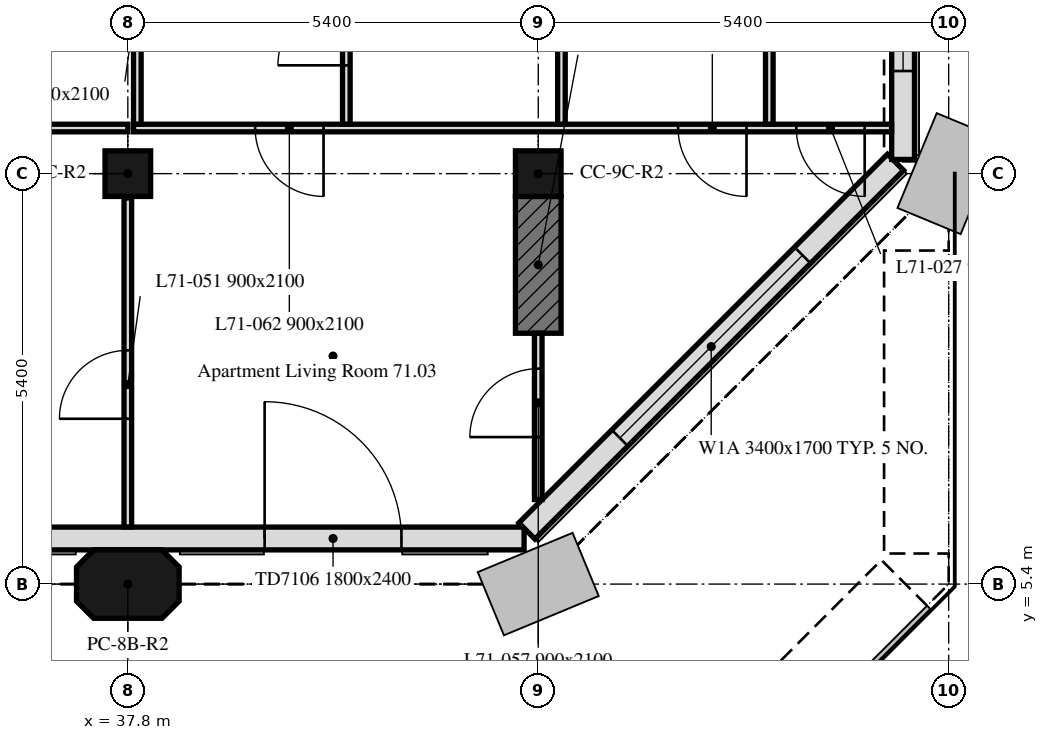
"""IFC4 building model, lengths in metres.
Left out: names, types, materials, properties, quantities, classifications, styles, units other than length and angle.
Written with IfcOpenShell. Run it as: python <this file> out.ifc"""

import sys

from ifc_helpers import new_model, si_unit, direction, frame, frame_2d, origin, origin_2d, place, context, subcontext, project, spatial, polyline, rectangle, outline, extrude, element, fill, save


model = new_model("IFC4")
c1 = context("Model", 3, precision=1e-05, world=origin(), true_north=direction((0.0, 1.0)))
c2 = subcontext(c1, "Body", "Model", "MODEL_VIEW")
j1 = project(units=[si_unit("LENGTHUNIT", "METRE"), si_unit("PLANEANGLEUNIT", "RADIAN")], contexts=[c1])
p1 = place(None, origin())
s1 = spatial("IfcSite", under=j1, at=p1, CompositionType="ELEMENT")
p2 = place(p1, origin())
s2 = spatial("IfcBuilding", under=s1, at=p2, CompositionType="ELEMENT")
p3 = place(p2, frame((0.0, 0.0, 288.4)))
s3 = spatial("IfcBuildingStorey", under=s2, at=p3, CompositionType="ELEMENT", Elevation=288.4)
p4 = place(p3, frame((37.8, 5.4, 0.0), z_axis=(0.0, 0.0, 1.0), x_axis=(1.0, 0.0, 0.0)))
e1 = element("IfcColumn", 1, at=p4, inside=s3, PredefinedType="COLUMN", context=c2, shape_type="SweptSolid", body=[
    extrude(outline(polyline([(-0.45, -0.45), (0.45, -0.45), (0.675, -0.225), (0.675, 0.225), (0.45, 0.45), (-0.45, 0.45), (-0.675, 0.225), (-0.675, -0.225), (-0.45, -0.45)])), origin(), (0.0, 0.0, 1.0), 3.0),
])
for number, where, z_axis, x_axis in (
    (2, (37.8, 10.8, 0.0), (0.0, 0.0, 1.0), (1.0, 0.0, 0.0)),
    (3, (43.2, 10.8, 0.0), (0.0, 0.0, 1.0), (1.0, 0.0, 0.0)),
):
    element("IfcColumn", number, at=place(p3, frame(where, z_axis=z_axis, x_axis=x_axis)), inside=s3, PredefinedType="COLUMN", context=c2, shape_type="SweptSolid", body=[
        extrude(rectangle(XDim=0.6, YDim=0.6, at=origin_2d()), origin(), (0.0, 0.0, 1.0), 3.0),
    ])
p5 = place(p3, frame((43.2, 8.7, 0.0), z_axis=(0.0, 0.0, 1.0), x_axis=(0.0, 1.0, 0.0)))
e4 = element("IfcWall", 4, at=p5, inside=s3, PredefinedType="SHEAR", context=c2, shape_type="SweptSolid", body=[
    extrude(rectangle(XDim=1.8, YDim=0.6, at=frame_2d((0.9, 0.0))), origin(), (0.0, 0.0, 1.0), 3.0),
])
p6 = place(p3, frame((10.986, 6.0, 0.0), z_axis=(0.0, 0.0, 1.0), x_axis=(1.0, 0.0, 0.0)))
e5 = element("IfcWall", 5, at=p6, inside=s3, PredefinedType="SOLIDWALL", context=c2, shape_type="SweptSolid", body=[
    extrude(rectangle(XDim=32.027, YDim=0.3, at=frame_2d((16.014, 0.0))), origin(), (0.0, 0.0, 1.0), 3.0),
])
p7 = place(p6, frame((1.614, 0.0, 0.0)))
e6 = element("IfcOpeningElement", 6, at=p7, cuts=e5, PredefinedType="OPENING", context=c2, shape_type="SweptSolid", body=[
    extrude(rectangle(XDim=1.8, YDim=2.4, at=frame_2d((0.9, 1.2))), frame((0.0, 0.16, 0.0), z_axis=(0.0, -1.0, 0.0), x_axis=(1.0, 0.0, 0.0)), (0.0, 0.0, 1.0), 0.32),
])
p8 = place(p6, frame((7.014, 0.0, 0.0)))
e7 = element("IfcOpeningElement", 7, at=p8, cuts=e5, PredefinedType="OPENING", context=c2, shape_type="SweptSolid", body=[
    extrude(rectangle(XDim=1.8, YDim=2.4, at=frame_2d((0.9, 1.2))), frame((0.0, 0.16, 0.0), z_axis=(0.0, -1.0, 0.0), x_axis=(1.0, 0.0, 0.0)), (0.0, 0.0, 1.0), 0.32),
])
p9 = place(p6, frame((12.414, 0.0, 0.0)))
e8 = element("IfcOpeningElement", 8, at=p9, cuts=e5, PredefinedType="OPENING", context=c2, shape_type="SweptSolid", body=[
    extrude(rectangle(XDim=1.8, YDim=2.4, at=frame_2d((0.9, 1.2))), frame((0.0, 0.16, 0.0), z_axis=(0.0, -1.0, 0.0), x_axis=(1.0, 0.0, 0.0)), (0.0, 0.0, 1.0), 0.32),
])
p10 = place(p6, frame((17.814, 0.0, 0.0)))
e9 = element("IfcOpeningElement", 9, at=p10, cuts=e5, PredefinedType="OPENING", context=c2, shape_type="SweptSolid", body=[
    extrude(rectangle(XDim=1.8, YDim=2.4, at=frame_2d((0.9, 1.2))), frame((0.0, 0.16, 0.0), z_axis=(0.0, -1.0, 0.0), x_axis=(1.0, 0.0, 0.0)), (0.0, 0.0, 1.0), 0.32),
])
p11 = place(p6, frame((23.214, 0.0, 0.0)))
e10 = element("IfcOpeningElement", 10, at=p11, cuts=e5, PredefinedType="OPENING", context=c2, shape_type="SweptSolid", body=[
    extrude(rectangle(XDim=1.8, YDim=2.4, at=frame_2d((0.9, 1.2))), frame((0.0, 0.16, 0.0), z_axis=(0.0, -1.0, 0.0), x_axis=(1.0, 0.0, 0.0)), (0.0, 0.0, 1.0), 0.32),
])
p12 = place(p6, frame((28.614, 0.0, 0.0)))
e11 = element("IfcOpeningElement", 11, at=p12, cuts=e5, PredefinedType="OPENING", context=c2, shape_type="SweptSolid", body=[
    extrude(rectangle(XDim=1.8, YDim=2.4, at=frame_2d((0.9, 1.2))), frame((0.0, 0.16, 0.0), z_axis=(0.0, -1.0, 0.0), x_axis=(1.0, 0.0, 0.0)), (0.0, 0.0, 1.0), 0.32),
])
p13 = place(p3, frame((43.051, 6.099, 0.0), z_axis=(0.0, 0.0, 1.0), x_axis=(0.707106781187, 0.707106781187, 0.0)))
e12 = element("IfcWall", 12, at=p13, inside=s3, PredefinedType="SOLIDWALL", context=c2, shape_type="SweptSolid", body=[
    extrude(rectangle(XDim=6.86, YDim=0.3, at=frame_2d((3.43, 0.0))), origin(), (0.0, 0.0, 1.0), 3.0),
])
p14 = place(p13, frame((1.73, 0.0, 0.9)))
e13 = element("IfcOpeningElement", 13, at=p14, cuts=e12, PredefinedType="OPENING", context=c2, shape_type="SweptSolid", body=[
    extrude(rectangle(XDim=3.4, YDim=1.7, at=frame_2d((1.7, 0.85))), frame((0.0, 0.16, 0.0), z_axis=(0.0, -1.0, 0.0), x_axis=(1.0, 0.0, 0.0)), (0.0, 0.0, 1.0), 0.32),
])
p15 = place(p3, frame((48.0, 10.986, 0.0), z_axis=(0.0, 0.0, 1.0), x_axis=(0.0, 1.0, 0.0)))
e14 = element("IfcWall", 14, at=p15, inside=s3, PredefinedType="SOLIDWALL", context=c2, shape_type="SweptSolid", body=[
    extrude(rectangle(XDim=32.027, YDim=0.3, at=frame_2d((16.014, 0.0))), origin(), (0.0, 0.0, 1.0), 3.0),
])
p16 = place(p15, frame((1.164, 0.0, 0.9)))
e15 = element("IfcOpeningElement", 15, at=p16, cuts=e14, PredefinedType="OPENING", context=c2, shape_type="SweptSolid", body=[
    extrude(rectangle(XDim=1.1, YDim=1.7, at=frame_2d((0.55, 0.85))), frame((0.0, 0.16, 0.0), z_axis=(0.0, -1.0, 0.0), x_axis=(1.0, 0.0, 0.0)), (0.0, 0.0, 1.0), 0.32),
])
p17 = place(p15, frame((3.114, 0.0, 0.9)))
e16 = element("IfcOpeningElement", 16, at=p17, cuts=e14, PredefinedType="OPENING", context=c2, shape_type="SweptSolid", body=[
    extrude(rectangle(XDim=1.1, YDim=1.7, at=frame_2d((0.55, 0.85))), frame((0.0, 0.16, 0.0), z_axis=(0.0, -1.0, 0.0), x_axis=(1.0, 0.0, 0.0)), (0.0, 0.0, 1.0), 0.32),
])
p18 = place(p15, frame((7.664, 0.0, 0.9)))
e17 = element("IfcOpeningElement", 17, at=p18, cuts=e14, PredefinedType="OPENING", context=c2, shape_type="SweptSolid", body=[
    extrude(rectangle(XDim=0.5, YDim=1.7, at=frame_2d((0.25, 0.85))), frame((0.0, 0.16, 0.0), z_axis=(0.0, -1.0, 0.0), x_axis=(1.0, 0.0, 0.0)), (0.0, 0.0, 1.0), 0.32),
])
p19 = place(p15, frame((13.064, 0.0, 0.9)))
e18 = element("IfcOpeningElement", 18, at=p19, cuts=e14, PredefinedType="OPENING", context=c2, shape_type="SweptSolid", body=[
    extrude(rectangle(XDim=0.5, YDim=1.7, at=frame_2d((0.25, 0.85))), frame((0.0, 0.16, 0.0), z_axis=(0.0, -1.0, 0.0), x_axis=(1.0, 0.0, 0.0)), (0.0, 0.0, 1.0), 0.32),
])
p20 = place(p15, frame((18.464, 0.0, 0.9)))
e19 = element("IfcOpeningElement", 19, at=p20, cuts=e14, PredefinedType="OPENING", context=c2, shape_type="SweptSolid", body=[
    extrude(rectangle(XDim=0.5, YDim=1.7, at=frame_2d((0.25, 0.85))), frame((0.0, 0.16, 0.0), z_axis=(0.0, -1.0, 0.0), x_axis=(1.0, 0.0, 0.0)), (0.0, 0.0, 1.0), 0.32),
])
p21 = place(p15, frame((23.864, 0.0, 0.9)))
e20 = element("IfcOpeningElement", 20, at=p21, cuts=e14, PredefinedType="OPENING", context=c2, shape_type="SweptSolid", body=[
    extrude(rectangle(XDim=0.5, YDim=1.7, at=frame_2d((0.25, 0.85))), frame((0.0, 0.16, 0.0), z_axis=(0.0, -1.0, 0.0), x_axis=(1.0, 0.0, 0.0)), (0.0, 0.0, 1.0), 0.32),
])
p22 = place(p15, frame((28.164, 0.0, 0.9)))
e21 = element("IfcOpeningElement", 21, at=p22, cuts=e14, PredefinedType="OPENING", context=c2, shape_type="SweptSolid", body=[
    extrude(rectangle(XDim=1.1, YDim=1.7, at=frame_2d((0.55, 0.85))), frame((0.0, 0.16, 0.0), z_axis=(0.0, -1.0, 0.0), x_axis=(1.0, 0.0, 0.0)), (0.0, 0.0, 1.0), 0.32),
])
p23 = place(p15, frame((29.589, 0.0, 0.9)))
e22 = element("IfcOpeningElement", 22, at=p23, cuts=e14, PredefinedType="OPENING", context=c2, shape_type="SweptSolid", body=[
    extrude(rectangle(XDim=0.65, YDim=1.7, at=frame_2d((0.325, 0.85))), frame((0.0, 0.16, 0.0), z_axis=(0.0, -1.0, 0.0), x_axis=(1.0, 0.0, 0.0)), (0.0, 0.0, 1.0), 0.32),
])
p24 = place(p3, frame((37.8, 11.4, 0.0), z_axis=(0.0, 0.0, 1.0), x_axis=(-1.0, 0.0, 0.0)))
e23 = element("IfcWall", 23, at=p24, inside=s3, PredefinedType="PARTITIONING", context=c2, shape_type="SweptSolid", body=[
    extrude(rectangle(XDim=21.6, YDim=0.1, at=frame_2d((10.8, 0.0))), origin(), (0.0, 0.0, 1.0), 3.0),
])
p25 = place(p24, frame((18.87, 0.0, 0.0)))
e24 = element("IfcOpeningElement", 24, at=p25, cuts=e23, PredefinedType="OPENING", context=c2, shape_type="SweptSolid", body=[
    extrude(rectangle(XDim=0.9, YDim=2.1, at=frame_2d((0.45, 1.05))), frame((0.0, 0.05, 0.0), z_axis=(0.0, -1.0, 0.0), x_axis=(1.0, 0.0, 0.0)), (0.0, 0.0, 1.0), 0.1),
])
p26 = place(p24, frame((17.5, 0.0, 0.0)))
e25 = element("IfcOpeningElement", 25, at=p26, cuts=e23, PredefinedType="OPENING", context=c2, shape_type="SweptSolid", body=[
    extrude(rectangle(XDim=0.9, YDim=2.1, at=frame_2d((0.45, 1.05))), frame((0.0, 0.05, 0.0), z_axis=(0.0, -1.0, 0.0), x_axis=(1.0, 0.0, 0.0)), (0.0, 0.0, 1.0), 0.1),
])
p27 = place(p24, frame((6.917, 0.0, 0.0)))
e26 = element("IfcOpeningElement", 26, at=p27, cuts=e23, PredefinedType="OPENING", context=c2, shape_type="SweptSolid", body=[
    extrude(rectangle(XDim=0.9, YDim=2.1, at=frame_2d((0.45, 1.05))), frame((0.0, 0.05, 0.0), z_axis=(0.0, -1.0, 0.0), x_axis=(1.0, 0.0, 0.0)), (0.0, 0.0, 1.0), 0.1),
])
p28 = place(p24, frame((3.15, 0.0, 0.0)))
e27 = element("IfcOpeningElement", 27, at=p28, cuts=e23, PredefinedType="OPENING", context=c2, shape_type="SweptSolid", body=[
    extrude(rectangle(XDim=0.9, YDim=2.1, at=frame_2d((0.45, 1.05))), frame((0.0, 0.05, 0.0), z_axis=(0.0, -1.0, 0.0), x_axis=(1.0, 0.0, 0.0)), (0.0, 0.0, 1.0), 0.1),
])
p29 = place(p24, frame((14.158, 0.0, 0.0)))
e28 = element("IfcOpeningElement", 28, at=p29, cuts=e23, PredefinedType="OPENING", context=c2, shape_type="SweptSolid", body=[
    extrude(rectangle(XDim=0.9, YDim=2.1, at=frame_2d((0.45, 1.05))), frame((0.0, 0.05, 0.0), z_axis=(0.0, -1.0, 0.0), x_axis=(1.0, 0.0, 0.0)), (0.0, 0.0, 1.0), 0.1),
])
p30 = place(p24, frame((12.788, 0.0, 0.0)))
e29 = element("IfcOpeningElement", 29, at=p30, cuts=e23, PredefinedType="OPENING", context=c2, shape_type="SweptSolid", body=[
    extrude(rectangle(XDim=0.9, YDim=2.1, at=frame_2d((0.45, 1.05))), frame((0.0, 0.05, 0.0), z_axis=(0.0, -1.0, 0.0), x_axis=(1.0, 0.0, 0.0)), (0.0, 0.0, 1.0), 0.1),
])
p31 = place(p3, frame((37.8, 6.151, 0.0), z_axis=(0.0, 0.0, 1.0), x_axis=(0.0, 1.0, 0.0)))
e30 = element("IfcWall", 30, at=p31, inside=s3, PredefinedType="PARTITIONING", context=c2, shape_type="SweptSolid", body=[
    extrude(rectangle(XDim=4.329, YDim=0.1, at=frame_2d((2.165, 0.0))), origin(), (0.0, 0.0, 1.0), 3.0),
])
p32 = place(p31, frame((1.424, 0.0, 0.0)))
e31 = element("IfcOpeningElement", 31, at=p32, cuts=e30, PredefinedType="OPENING", context=c2, shape_type="SweptSolid", body=[
    extrude(rectangle(XDim=0.9, YDim=2.1, at=frame_2d((0.45, 1.05))), frame((0.0, 0.05, 0.0), z_axis=(0.0, -1.0, 0.0), x_axis=(1.0, 0.0, 0.0)), (0.0, 0.0, 1.0), 0.1),
])
p33 = place(p3, frame((47.849, 11.4, 0.0), z_axis=(0.0, 0.0, 1.0), x_axis=(-1.0, 0.0, 0.0)))
e32 = element("IfcWall", 32, at=p33, inside=s3, PredefinedType="PARTITIONING", context=c2, shape_type="SweptSolid", body=[
    extrude(rectangle(XDim=9.974, YDim=0.1, at=frame_2d((4.987, 0.0))), origin(), (0.0, 0.0, 1.0), 3.0),
])
p34 = place(p33, frame((1.909, 0.0, 0.0)))
e33 = element("IfcOpeningElement", 33, at=p34, cuts=e32, PredefinedType="OPENING", context=c2, shape_type="SweptSolid", body=[
    extrude(rectangle(XDim=0.9, YDim=2.1, at=frame_2d((0.45, 1.05))), frame((0.0, 0.05, 0.0), z_axis=(0.0, -1.0, 0.0), x_axis=(1.0, 0.0, 0.0)), (0.0, 0.0, 1.0), 0.1),
])
p35 = place(p33, frame((0.354, 0.0, 0.0)))
e34 = element("IfcOpeningElement", 34, at=p35, cuts=e32, PredefinedType="OPENING", context=c2, shape_type="SweptSolid", body=[
    extrude(rectangle(XDim=0.9, YDim=2.1, at=frame_2d((0.45, 1.05))), frame((0.0, 0.05, 0.0), z_axis=(0.0, -1.0, 0.0), x_axis=(1.0, 0.0, 0.0)), (0.0, 0.0, 1.0), 0.1),
])
p36 = place(p33, frame((7.474, 0.0, 0.0)))
e35 = element("IfcOpeningElement", 35, at=p36, cuts=e32, PredefinedType="OPENING", context=c2, shape_type="SweptSolid", body=[
    extrude(rectangle(XDim=0.9, YDim=2.1, at=frame_2d((0.45, 1.05))), frame((0.0, 0.05, 0.0), z_axis=(0.0, -1.0, 0.0), x_axis=(1.0, 0.0, 0.0)), (0.0, 0.0, 1.0), 0.1),
])
p37 = place(p3, frame((43.2, 6.512, 0.0), z_axis=(0.0, 0.0, 1.0), x_axis=(0.0, 1.0, 0.0)))
e36 = element("IfcWall", 36, at=p37, inside=s3, PredefinedType="PARTITIONING", context=c2, shape_type="SweptSolid", body=[
    extrude(rectangle(XDim=2.188, YDim=0.1, at=frame_2d((1.094, 0.0))), origin(), (0.0, 0.0, 1.0), 3.0),
])
p38 = place(p37, frame((0.822, 0.0, 0.0)))
e37 = element("IfcOpeningElement", 37, at=p38, cuts=e36, PredefinedType="OPENING", context=c2, shape_type="SweptSolid", body=[
    extrude(rectangle(XDim=0.9, YDim=2.1, at=frame_2d((0.45, 1.05))), frame((0.0, 0.05, 0.0), z_axis=(0.0, -1.0, 0.0), x_axis=(1.0, 0.0, 0.0)), (0.0, 0.0, 1.0), 0.1),
])
p39 = place(p3, frame((37.925, 11.45, 0.0), z_axis=(0.0, 0.0, 1.0), x_axis=(0.0, 1.0, 0.0)))
e38 = element("IfcWall", 38, at=p39, inside=s3, PredefinedType="PARTITIONING", context=c2, shape_type="SweptSolid", body=[
    extrude(rectangle(XDim=2.425, YDim=0.1, at=frame_2d((1.212, 0.0))), origin(), (0.0, 0.0, 1.0), 3.0),
])
p40 = place(p39, frame((1.275, 0.0, 0.0)))
e39 = element("IfcOpeningElement", 39, at=p40, cuts=e38, PredefinedType="OPENING", context=c2, shape_type="SweptSolid", body=[
    extrude(rectangle(XDim=0.9, YDim=2.1, at=frame_2d((0.45, 1.05))), frame((0.0, 0.05, 0.0), z_axis=(0.0, -1.0, 0.0), x_axis=(1.0, 0.0, 0.0)), (0.0, 0.0, 1.0), 0.1),
])
p41 = place(p3, frame((40.675, 11.45, 0.0), z_axis=(0.0, 0.0, 1.0), x_axis=(0.0, 1.0, 0.0)))
e40 = element("IfcWall", 40, at=p41, inside=s3, PredefinedType="PARTITIONING", context=c2, shape_type="SweptSolid", body=[
    extrude(rectangle(XDim=2.425, YDim=0.1, at=frame_2d((1.212, 0.0))), origin(), (0.0, 0.0, 1.0), 3.0),
])
p42 = place(p41, frame((0.775, 0.0, 0.0)))
e41 = element("IfcOpeningElement", 41, at=p42, cuts=e40, PredefinedType="OPENING", context=c2, shape_type="SweptSolid", body=[
    extrude(rectangle(XDim=0.9, YDim=2.1, at=frame_2d((0.45, 1.05))), frame((0.0, 0.05, 0.0), z_axis=(0.0, -1.0, 0.0), x_axis=(1.0, 0.0, 0.0)), (0.0, 0.0, 1.0), 0.1),
])
for number, where, z_axis, x_axis in (
    (42, (43.505, 11.45, 0.0), (0.0, 0.0, 1.0), (0.0, 1.0, 0.0)),
    (43, (46.24, 11.45, 0.0), (0.0, 0.0, 1.0), (0.0, 1.0, 0.0)),
):
    element("IfcWall", number, at=place(p3, frame(where, z_axis=z_axis, x_axis=x_axis)), inside=s3, PredefinedType="PARTITIONING", context=c2, shape_type="SweptSolid", body=[
        extrude(rectangle(XDim=2.425, YDim=0.1, at=frame_2d((1.212, 0.0))), origin(), (0.0, 0.0, 1.0), 3.0),
    ])
p43 = place(p12, origin())
e44 = element("IfcDoor", 44, at=p43, inside=s3, OperationType="DOUBLE_DOOR_DOUBLE_SWING", PredefinedType="DOOR", context=c2, shape_type="SweptSolid", body=[
    extrude(rectangle(XDim=1.8, YDim=2.4, at=frame_2d((0.9, 1.2))), frame((0.0, 0.025, 0.0), z_axis=(0.0, -1.0, 0.0), x_axis=(1.0, 0.0, 0.0)), (0.0, 0.0, 1.0), 0.05),
])
fill(e11, e44)
p44 = place(p14, origin())
e45 = element("IfcWindow", 45, at=p44, inside=s3, PartitioningType="SINGLE_PANEL", PredefinedType="WINDOW", context=c2, shape_type="SweptSolid", body=[
    extrude(rectangle(XDim=3.4, YDim=1.7, at=frame_2d((1.7, 0.85))), frame((0.0, 0.03, 0.0), z_axis=(0.0, -1.0, 0.0), x_axis=(1.0, 0.0, 0.0)), (0.0, 0.0, 1.0), 0.06),
])
fill(e13, e45)
p45 = place(p16, origin())
e46 = element("IfcWindow", 46, at=p45, inside=s3, PartitioningType="SINGLE_PANEL", PredefinedType="WINDOW", context=c2, shape_type="SweptSolid", body=[
    extrude(rectangle(XDim=1.1, YDim=1.7, at=frame_2d((0.55, 0.85))), frame((0.0, 0.03, 0.0), z_axis=(0.0, -1.0, 0.0), x_axis=(1.0, 0.0, 0.0)), (0.0, 0.0, 1.0), 0.06),
])
fill(e15, e46)
p46 = place(p34, origin())
e47 = element("IfcDoor", 47, at=p46, inside=s3, OperationType="SINGLE_SWING_LEFT", PredefinedType="DOOR", context=c2, shape_type="SweptSolid", body=[
    extrude(rectangle(XDim=0.9, YDim=2.1, at=frame_2d((0.45, 1.05))), frame((0.0, 0.025, 0.0), z_axis=(0.0, -1.0, 0.0), x_axis=(1.0, 0.0, 0.0)), (0.0, 0.0, 1.0), 0.05),
])
fill(e33, e47)
p47 = place(p35, origin())
e48 = element("IfcDoor", 48, at=p47, inside=s3, OperationType="SINGLE_SWING_RIGHT", PredefinedType="DOOR", context=c2, shape_type="SweptSolid", body=[
    extrude(rectangle(XDim=0.9, YDim=2.1, at=frame_2d((0.45, 1.05))), frame((0.0, 0.025, 0.0), z_axis=(0.0, -1.0, 0.0), x_axis=(1.0, 0.0, 0.0)), (0.0, 0.0, 1.0), 0.05),
])
fill(e34, e48)
p48 = place(p42, origin())
e49 = element("IfcDoor", 49, at=p48, inside=s3, OperationType="SINGLE_SWING_LEFT", PredefinedType="DOOR", context=c2, shape_type="SweptSolid", body=[
    extrude(rectangle(XDim=0.9, YDim=2.1, at=frame_2d((0.45, 1.05))), frame((0.0, 0.025, 0.0), z_axis=(0.0, -1.0, 0.0), x_axis=(1.0, 0.0, 0.0)), (0.0, 0.0, 1.0), 0.05),
])
fill(e41, e49)
p49 = place(p32, origin())
e50 = element("IfcDoor", 50, at=p49, inside=s3, OperationType="SINGLE_SWING_LEFT", PredefinedType="DOOR", context=c2, shape_type="SweptSolid", body=[
    extrude(rectangle(XDim=0.9, YDim=2.1, at=frame_2d((0.45, 1.05))), frame((0.0, 0.025, 0.0), z_axis=(0.0, -1.0, 0.0), x_axis=(1.0, 0.0, 0.0)), (0.0, 0.0, 1.0), 0.05),
])
fill(e31, e50)
p50 = place(p38, origin())
e51 = element("IfcDoor", 51, at=p50, inside=s3, OperationType="SINGLE_SWING_RIGHT", PredefinedType="DOOR", context=c2, shape_type="SweptSolid", body=[
    extrude(rectangle(XDim=0.9, YDim=2.1, at=frame_2d((0.45, 1.05))), frame((0.0, 0.025, 0.0), z_axis=(0.0, -1.0, 0.0), x_axis=(1.0, 0.0, 0.0)), (0.0, 0.0, 1.0), 0.05),
])
fill(e37, e51)
p51 = place(p36, origin())
e52 = element("IfcDoor", 52, at=p51, inside=s3, OperationType="SINGLE_SWING_RIGHT", PredefinedType="DOOR", context=c2, shape_type="SweptSolid", body=[
    extrude(rectangle(XDim=0.9, YDim=2.1, at=frame_2d((0.45, 1.05))), frame((0.0, 0.025, 0.0), z_axis=(0.0, -1.0, 0.0), x_axis=(1.0, 0.0, 0.0)), (0.0, 0.0, 1.0), 0.05),
])
fill(e35, e52)
save(model, sys.argv[1])
